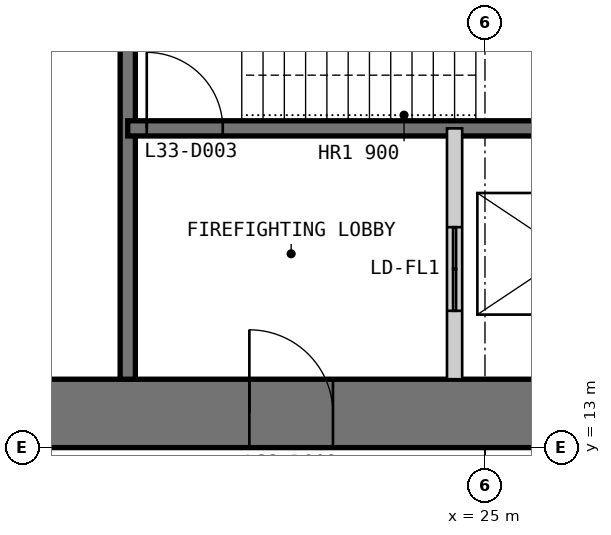
"""IFC4 building model, lengths in metres.
Left out: names, types, materials, properties, quantities, classifications, styles, units other than length and angle.
Written with IfcOpenShell. Run it as: python <this file> out.ifc"""

import sys

from ifc_helpers import new_model, si_unit, direction, frame, frame_2d, origin, place, context, subcontext, project, spatial, polyline, rectangle, outline, extrude, element, fill, save


model = new_model("IFC4")
c1 = context("Model", 3, precision=1e-05, world=origin(), true_north=direction((0.0, 1.0)))
c2 = subcontext(c1, "Body", "Model", "MODEL_VIEW")
j1 = project(units=[si_unit("LENGTHUNIT", "METRE"), si_unit("PLANEANGLEUNIT", "RADIAN")], contexts=[c1])
p1 = place(None, origin())
s1 = spatial("IfcSite", under=j1, at=p1, CompositionType="ELEMENT")
p2 = place(p1, origin())
s2 = spatial("IfcBuilding", under=s1, at=p2, CompositionType="ELEMENT")
p3 = place(p2, frame((0.0, 0.0, 142.4)))
s3 = spatial("IfcBuildingStorey", under=s2, at=p3, CompositionType="ELEMENT", Elevation=142.4)
p4 = place(p3, frame((13.0, 13.45, 0.0), z_axis=(0.0, 0.0, 1.0), x_axis=(1.0, 0.0, 0.0)))
e1 = element("IfcWall", 1, at=p4, inside=s3, PredefinedType="SHEAR", context=c2, shape_type="SweptSolid", body=[
    extrude(outline(polyline([(0.0, -0.45), (24.0, -0.45), (23.1, 0.45), (0.9, 0.45), (0.0, -0.45)])), origin(), (0.0, 0.0, 1.0), 4.0),
])
p5 = place(p4, frame((4.9, 0.0, 0.0)))
e2 = element("IfcOpeningElement", 2, at=p5, cuts=e1, PredefinedType="OPENING", context=c2, shape_type="SweptSolid", body=[
    extrude(rectangle(XDim=1.0, YDim=2.2, at=frame_2d((0.5, 1.1))), frame((0.0, 0.46, 0.0), z_axis=(0.0, -1.0, 0.0), x_axis=(1.0, 0.0, 0.0)), (0.0, 0.0, 1.0), 0.92),
])
p6 = place(p4, frame((8.9, 0.0, 0.0)))
e3 = element("IfcOpeningElement", 3, at=p6, cuts=e1, PredefinedType="OPENING", context=c2, shape_type="SweptSolid", body=[
    extrude(rectangle(XDim=1.1, YDim=2.2, at=frame_2d((0.55, 1.1))), frame((0.0, 0.46, 0.0), z_axis=(0.0, -1.0, 0.0), x_axis=(1.0, 0.0, 0.0)), (0.0, 0.0, 1.0), 0.92),
])
p7 = place(p4, frame((15.05, 0.0, 0.0)))
e4 = element("IfcOpeningElement", 4, at=p7, cuts=e1, PredefinedType="OPENING", context=c2, shape_type="SweptSolid", body=[
    extrude(rectangle(XDim=0.9, YDim=2.2, at=frame_2d((0.45, 1.1))), frame((0.0, 0.46, 0.0), z_axis=(0.0, -1.0, 0.0), x_axis=(1.0, 0.0, 0.0)), (0.0, 0.0, 1.0), 0.92),
])
p8 = place(p4, frame((17.9, 0.0, 0.0)))
e5 = element("IfcOpeningElement", 5, at=p8, cuts=e1, PredefinedType="OPENING", context=c2, shape_type="SweptSolid", body=[
    extrude(rectangle(XDim=1.0, YDim=2.2, at=frame_2d((0.5, 1.1))), frame((0.0, 0.46, 0.0), z_axis=(0.0, -1.0, 0.0), x_axis=(1.0, 0.0, 0.0)), (0.0, 0.0, 1.0), 0.92),
])
p9 = place(p4, frame((21.4, 0.0, 0.0)))
e6 = element("IfcOpeningElement", 6, at=p9, cuts=e1, PredefinedType="OPENING", context=c2, shape_type="SweptSolid", body=[
    extrude(rectangle(XDim=1.0, YDim=2.2, at=frame_2d((0.5, 1.1))), frame((0.0, 0.46, 0.0), z_axis=(0.0, -1.0, 0.0), x_axis=(1.0, 0.0, 0.0)), (0.0, 0.0, 1.0), 0.92),
])
p10 = place(p3, frame((20.3, 13.9, 0.0), z_axis=(0.0, 0.0, 1.0), x_axis=(0.0, 1.0, 0.0)))
e7 = element("IfcWall", 7, at=p10, inside=s3, PredefinedType="SOLIDWALL", context=c2, shape_type="SweptSolid", body=[
    extrude(rectangle(XDim=16.1, YDim=0.2, at=frame_2d((8.05, 0.0))), origin(), (0.0, 0.0, 1.0), 3.8),
])
p11 = place(p10, frame((7.217, 0.0, 0.0)))
e8 = element("IfcOpeningElement", 8, at=p11, cuts=e7, PredefinedType="OPENING", context=c2, shape_type="SweptSolid", body=[
    extrude(rectangle(XDim=1.1, YDim=2.2, at=frame_2d((0.55, 1.1))), frame((0.0, 0.11, 0.0), z_axis=(0.0, -1.0, 0.0), x_axis=(1.0, 0.0, 0.0)), (0.0, 0.0, 1.0), 0.22),
])
p12 = place(p10, frame((10.55, 0.0, 0.0)))
e9 = element("IfcOpeningElement", 9, at=p12, cuts=e7, PredefinedType="OPENING", context=c2, shape_type="SweptSolid", body=[
    extrude(rectangle(XDim=1.1, YDim=2.2, at=frame_2d((0.55, 1.1))), frame((0.0, 0.11, 0.0), z_axis=(0.0, -1.0, 0.0), x_axis=(1.0, 0.0, 0.0)), (0.0, 0.0, 1.0), 0.22),
])
p13 = place(p10, frame((13.883, 0.0, 0.0)))
e10 = element("IfcOpeningElement", 10, at=p13, cuts=e7, PredefinedType="OPENING", context=c2, shape_type="SweptSolid", body=[
    extrude(rectangle(XDim=1.1, YDim=2.2, at=frame_2d((0.55, 1.1))), frame((0.0, 0.11, 0.0), z_axis=(0.0, -1.0, 0.0), x_axis=(1.0, 0.0, 0.0)), (0.0, 0.0, 1.0), 0.22),
])
p14 = place(p3, frame((20.3, 17.2, 0.0), z_axis=(0.0, 0.0, 1.0), x_axis=(1.0, 0.0, 0.0)))
e11 = element("IfcWall", 11, at=p14, inside=s3, PredefinedType="SOLIDWALL", context=c2, shape_type="SweptSolid", body=[
    extrude(rectangle(XDim=9.4, YDim=0.2, at=frame_2d((4.7, 0.0))), origin(), (0.0, 0.0, 1.0), 3.8),
])
p15 = place(p14, frame((0.25, 0.0, 0.0)))
e12 = element("IfcOpeningElement", 12, at=p15, cuts=e11, PredefinedType="OPENING", context=c2, shape_type="SweptSolid", body=[
    extrude(rectangle(XDim=1.0, YDim=2.2, at=frame_2d((0.5, 1.1))), frame((0.0, 0.11, 0.0), z_axis=(0.0, -1.0, 0.0), x_axis=(1.0, 0.0, 0.0)), (0.0, 0.0, 1.0), 0.22),
])
p16 = place(p3, frame((24.6, 13.9, 0.0), z_axis=(0.0, 0.0, 1.0), x_axis=(0.0, 1.0, 0.0)))
e13 = element("IfcWall", 13, at=p16, inside=s3, PredefinedType="PARTITIONING", context=c2, shape_type="SweptSolid", body=[
    extrude(rectangle(XDim=3.3, YDim=0.2, at=frame_2d((1.65, 0.0))), origin(), (0.0, 0.0, 1.0), 3.8),
])
p17 = place(p16, frame((0.9, 0.0, 0.0)))
e14 = element("IfcOpeningElement", 14, at=p17, cuts=e13, PredefinedType="OPENING", context=c2, shape_type="SweptSolid", body=[
    extrude(rectangle(XDim=1.1, YDim=2.2, at=frame_2d((0.55, 1.1))), frame((0.0, 0.11, 0.0), z_axis=(0.0, -1.0, 0.0), x_axis=(1.0, 0.0, 0.0)), (0.0, 0.0, 1.0), 0.22),
])
p18 = place(p6, origin())
e15 = element("IfcDoor", 15, at=p18, inside=s3, OperationType="SINGLE_SWING_LEFT", PredefinedType="DOOR", context=c2, shape_type="SweptSolid", body=[
    extrude(rectangle(XDim=1.1, YDim=2.2, at=frame_2d((0.55, 1.1))), frame((0.0, 0.025, 0.0), z_axis=(0.0, -1.0, 0.0), x_axis=(1.0, 0.0, 0.0)), (0.0, 0.0, 1.0), 0.05),
    extrude(outline(polyline([(0.0, 0.0), (0.04, 0.0), (0.04, 2.16), (1.06, 2.16), (1.06, 0.0), (1.1, 0.0), (1.1, 2.2), (0.0, 2.2), (0.0, 0.0)])), frame((0.0, 0.3, 0.0), z_axis=(0.0, -1.0, 0.0), x_axis=(1.0, 0.0, 0.0)), (0.0, 0.0, 1.0), 0.6),
])
fill(e3, e15)
p19 = place(p15, origin())
e16 = element("IfcDoor", 16, at=p19, inside=s3, OperationType="SINGLE_SWING_LEFT", PredefinedType="DOOR", context=c2, shape_type="SweptSolid", body=[
    extrude(rectangle(XDim=1.0, YDim=2.2, at=frame_2d((0.5, 1.1))), frame((0.0, 0.025, 0.0), z_axis=(0.0, -1.0, 0.0), x_axis=(1.0, 0.0, 0.0)), (0.0, 0.0, 1.0), 0.05),
])
fill(e12, e16)
p20 = place(p17, origin())
e17 = element("IfcDoor", 17, at=p20, inside=s3, OperationType="DOUBLE_DOOR_SLIDING", PredefinedType="DOOR", context=c2, shape_type="SweptSolid", body=[
    extrude(rectangle(XDim=1.1, YDim=2.2, at=frame_2d((0.55, 1.1))), frame((0.0, 0.025, 0.0), z_axis=(0.0, -1.0, 0.0), x_axis=(1.0, 0.0, 0.0)), (0.0, 0.0, 1.0), 0.05),
])
fill(e14, e17)
save(model, sys.argv[1])
